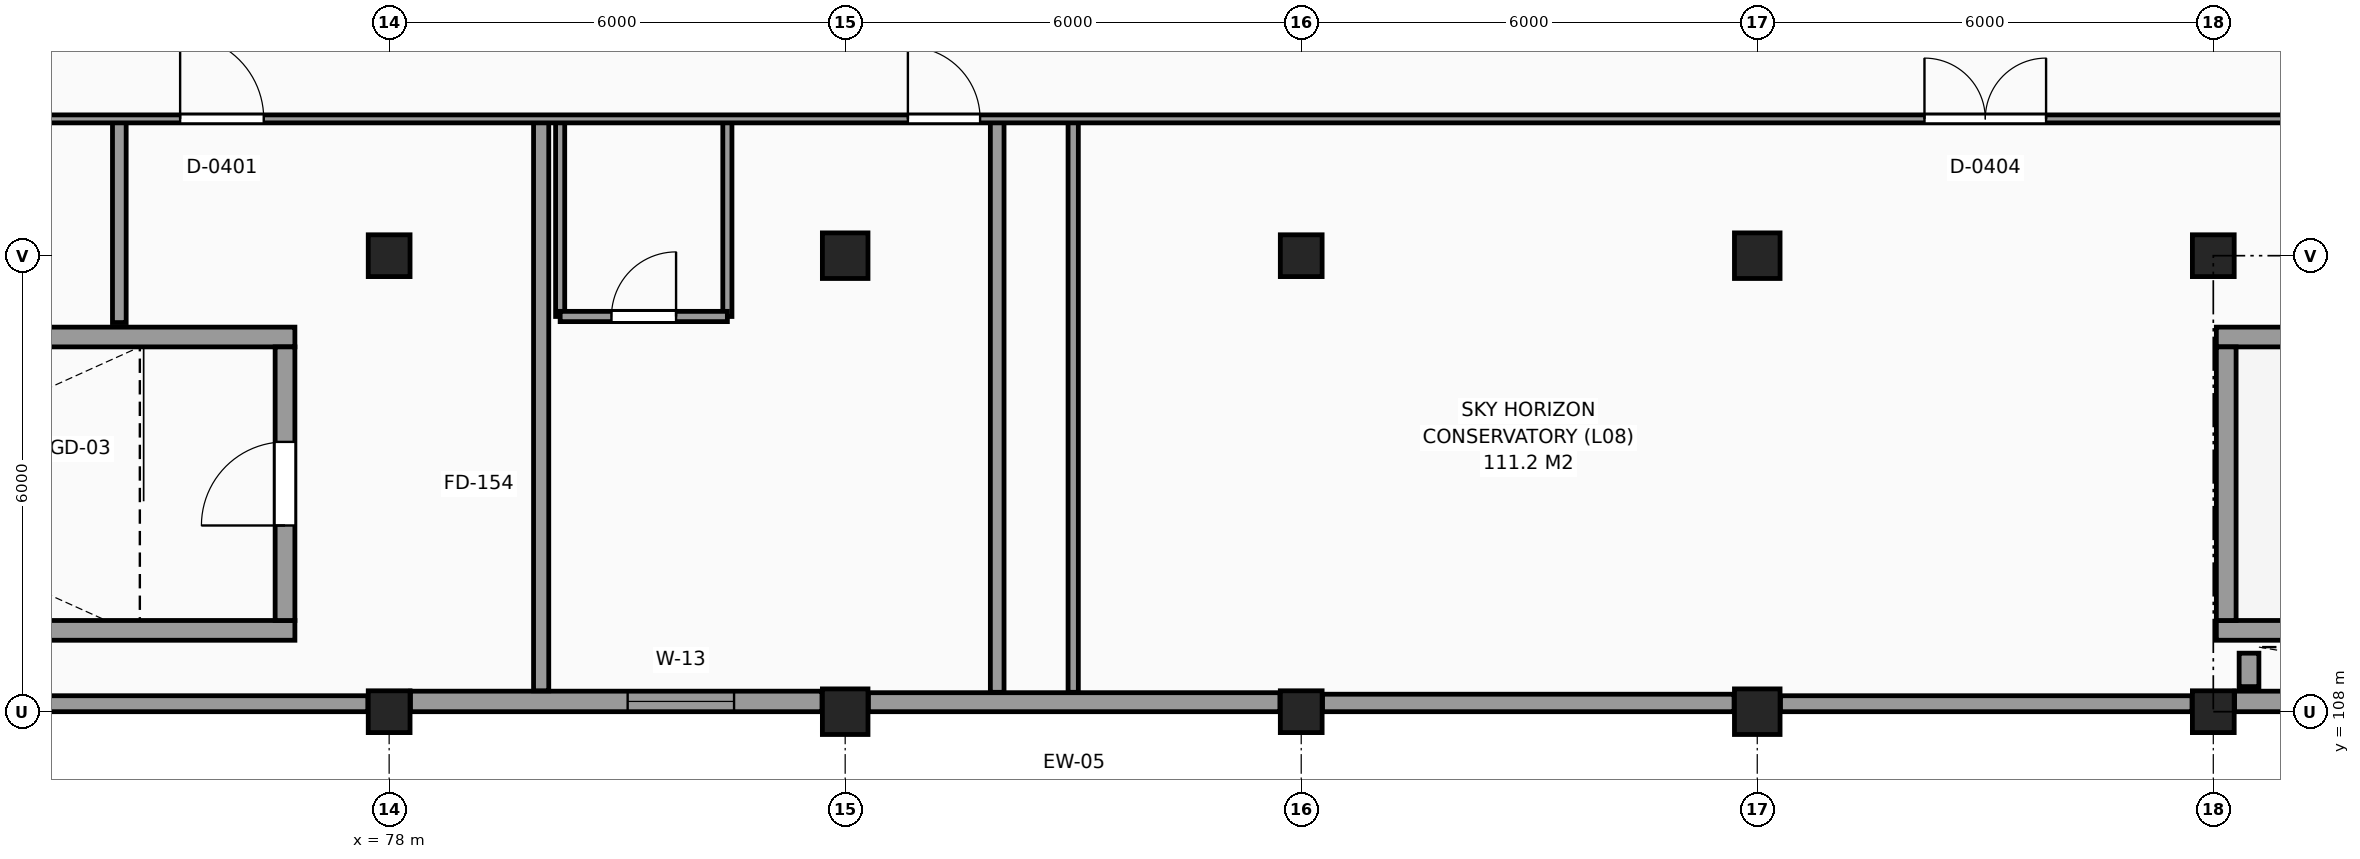
"""IFC4 building model, lengths in metres.
Left out: names, types, materials, properties, quantities, classifications, styles, units other than length and angle.
Written with IfcOpenShell. Run it as: python <this file> out.ifc"""

import sys

from ifc_helpers import new_model, si_unit, direction, frame, frame_2d, origin, origin_2d, place, context, subcontext, project, spatial, rectangle, extrude, element, fill, save


model = new_model("IFC4")
c1 = context("Model", 3, precision=1e-05, world=origin(), true_north=direction((0.0, 1.0)))
c2 = subcontext(c1, "Body", "Model", "MODEL_VIEW")
j1 = project(units=[si_unit("LENGTHUNIT", "METRE"), si_unit("PLANEANGLEUNIT", "RADIAN")], contexts=[c1])
p1 = place(None, origin())
s1 = spatial("IfcSite", under=j1, at=p1, CompositionType="ELEMENT")
p2 = place(p1, origin())
s2 = spatial("IfcBuilding", under=s1, at=p2, CompositionType="ELEMENT")
p3 = place(p2, frame((0.0, 0.0, 34.8)))
s3 = spatial("IfcBuildingStorey", under=s2, at=p3, CompositionType="ELEMENT", Elevation=34.8)
for number, where, z_axis, x_axis in (
    (1, (78.0, 108.0, 0.0), (0.0, 0.0, 1.0), (1.0, 0.0, 0.0)),
    (2, (78.0, 114.0, 0.0), (0.0, 0.0, 1.0), (1.0, 0.0, 0.0)),
):
    element("IfcColumn", number, at=place(p3, frame(where, z_axis=z_axis, x_axis=x_axis)), inside=s3, PredefinedType="COLUMN", context=c2, shape_type="SweptSolid", body=[
        extrude(rectangle(XDim=0.55, YDim=0.55, at=origin_2d()), origin(), (0.0, 0.0, 1.0), 3.3),
    ])
for number, where, z_axis, x_axis in (
    (3, (84.0, 108.0, 0.0), (0.0, 0.0, 1.0), (1.0, 0.0, 0.0)),
    (4, (84.0, 114.0, 0.0), (0.0, 0.0, 1.0), (1.0, 0.0, 0.0)),
):
    element("IfcColumn", number, at=place(p3, frame(where, z_axis=z_axis, x_axis=x_axis)), inside=s3, PredefinedType="COLUMN", context=c2, shape_type="SweptSolid", body=[
        extrude(rectangle(XDim=0.6, YDim=0.6, at=origin_2d()), origin(), (0.0, 0.0, 1.0), 3.3),
    ])
for number, where, z_axis, x_axis in (
    (5, (90.0, 108.0, 0.0), (0.0, 0.0, 1.0), (1.0, 0.0, 0.0)),
    (6, (90.0, 114.0, 0.0), (0.0, 0.0, 1.0), (1.0, 0.0, 0.0)),
):
    element("IfcColumn", number, at=place(p3, frame(where, z_axis=z_axis, x_axis=x_axis)), inside=s3, PredefinedType="COLUMN", context=c2, shape_type="SweptSolid", body=[
        extrude(rectangle(XDim=0.55, YDim=0.55, at=origin_2d()), origin(), (0.0, 0.0, 1.0), 3.3),
    ])
for number, where, z_axis, x_axis in (
    (7, (96.0, 108.0, 0.0), (0.0, 0.0, 1.0), (1.0, 0.0, 0.0)),
    (8, (96.0, 114.0, 0.0), (0.0, 0.0, 1.0), (1.0, 0.0, 0.0)),
):
    element("IfcColumn", number, at=place(p3, frame(where, z_axis=z_axis, x_axis=x_axis)), inside=s3, PredefinedType="COLUMN", context=c2, shape_type="SweptSolid", body=[
        extrude(rectangle(XDim=0.6, YDim=0.6, at=origin_2d()), origin(), (0.0, 0.0, 1.0), 3.3),
    ])
for number, where, z_axis, x_axis in (
    (9, (102.0, 108.0, 0.0), (0.0, 0.0, 1.0), (1.0, 0.0, 0.0)),
    (10, (102.0, 114.0, 0.0), (0.0, 0.0, 1.0), (1.0, 0.0, 0.0)),
):
    element("IfcColumn", number, at=place(p3, frame(where, z_axis=z_axis, x_axis=x_axis)), inside=s3, PredefinedType="COLUMN", context=c2, shape_type="SweptSolid", body=[
        extrude(rectangle(XDim=0.55, YDim=0.55, at=origin_2d()), origin(), (0.0, 0.0, 1.0), 3.3),
    ])
p4 = place(p3, frame((72.305, 108.105, 0.0), z_axis=(0.0, 0.0, 1.0), x_axis=(1.0, 0.0, 0.0)))
e11 = element("IfcWall", 11, at=p4, inside=s3, PredefinedType="SOLIDWALL", context=c2, shape_type="SweptSolid", body=[
    extrude(rectangle(XDim=5.415, YDim=0.21, at=frame_2d((2.708, 0.0))), origin(), (0.0, 0.0, 1.0), 2.445),
])
p5 = place(p3, frame((78.28, 108.135, 0.0), z_axis=(0.0, 0.0, 1.0), x_axis=(1.0, 0.0, 0.0)))
e12 = element("IfcWall", 12, at=p5, inside=s3, PredefinedType="SOLIDWALL", context=c2, shape_type="SweptSolid", body=[
    extrude(rectangle(XDim=5.415, YDim=0.27, at=frame_2d((2.708, 0.0))), origin(), (0.0, 0.0, 1.0), 2.445),
])
p6 = place(p5, frame((2.858, 0.0, 0.8)))
e13 = element("IfcOpeningElement", 13, at=p6, cuts=e12, PredefinedType="OPENING", context=c2, shape_type="SweptSolid", body=[
    extrude(rectangle(XDim=1.4, YDim=1.4, at=frame_2d((0.7, 0.7))), frame((0.0, 0.145, 0.0), z_axis=(0.0, -1.0, 0.0), x_axis=(1.0, 0.0, 0.0)), (0.0, 0.0, 1.0), 0.29),
])
p7 = place(p3, frame((84.305, 108.125, 0.0), z_axis=(0.0, 0.0, 1.0), x_axis=(1.0, 0.0, 0.0)))
e14 = element("IfcWall", 14, at=p7, inside=s3, PredefinedType="SOLIDWALL", context=c2, shape_type="SweptSolid", body=[
    extrude(rectangle(XDim=5.415, YDim=0.25, at=frame_2d((2.708, 0.0))), origin(), (0.0, 0.0, 1.0), 2.445),
])
p8 = place(p3, frame((90.28, 108.115, 0.0), z_axis=(0.0, 0.0, 1.0), x_axis=(1.0, 0.0, 0.0)))
e15 = element("IfcWall", 15, at=p8, inside=s3, PredefinedType="SOLIDWALL", context=c2, shape_type="SweptSolid", body=[
    extrude(rectangle(XDim=5.415, YDim=0.23, at=frame_2d((2.708, 0.0))), origin(), (0.0, 0.0, 1.0), 2.445),
])
p9 = place(p3, frame((96.305, 108.105, 0.0), z_axis=(0.0, 0.0, 1.0), x_axis=(1.0, 0.0, 0.0)))
e16 = element("IfcWall", 16, at=p9, inside=s3, PredefinedType="SOLIDWALL", context=c2, shape_type="SweptSolid", body=[
    extrude(rectangle(XDim=5.415, YDim=0.21, at=frame_2d((2.708, 0.0))), origin(), (0.0, 0.0, 1.0), 2.445),
])
p10 = place(p3, frame((102.28, 108.135, 0.0), z_axis=(0.0, 0.0, 1.0), x_axis=(1.0, 0.0, 0.0)))
e17 = element("IfcWall", 17, at=p10, inside=s3, PredefinedType="SOLIDWALL", context=c2, shape_type="SweptSolid", body=[
    extrude(rectangle(XDim=5.415, YDim=0.27, at=frame_2d((2.708, 0.0))), origin(), (0.0, 0.0, 1.0), 3.07),
])
for number, where, z_axis, x_axis in (
    (18, (102.04, 109.07, 0.0), (0.0, 0.0, 1.0), (1.0, 0.0, 0.0)),
    (19, (102.04, 112.93, 0.0), (0.0, 0.0, 1.0), (1.0, 0.0, 0.0)),
):
    element("IfcWall", number, at=place(p3, frame(where, z_axis=z_axis, x_axis=x_axis)), inside=s3, PredefinedType="SHEAR", context=c2, shape_type="SweptSolid", body=[
        extrude(rectangle(XDim=10.72, YDim=0.26, at=frame_2d((5.36, 0.0))), origin(), (0.0, 0.0, 1.0), 3.3),
    ])
p11 = place(p3, frame((102.17, 109.2, 0.0), z_axis=(0.0, 0.0, 1.0), x_axis=(0.0, 1.0, 0.0)))
e20 = element("IfcWall", 20, at=p11, inside=s3, PredefinedType="SHEAR", context=c2, shape_type="SweptSolid", body=[
    extrude(rectangle(XDim=3.6, YDim=0.26, at=frame_2d((1.8, 0.0))), origin(), (0.0, 0.0, 1.0), 3.3),
])
p12 = place(p3, frame((102.47, 108.33, 0.0), z_axis=(0.0, 0.0, 1.0), x_axis=(0.0, 1.0, 0.0)))
e21 = element("IfcWall", 21, at=p12, inside=s3, PredefinedType="SHEAR", context=c2, shape_type="SweptSolid", body=[
    extrude(rectangle(XDim=0.44, YDim=0.26, at=frame_2d((0.22, 0.0))), origin(), (0.0, 0.0, 1.0), 3.3),
])
for number, where, z_axis, x_axis in (
    (22, (66.04, 109.07, 0.0), (0.0, 0.0, 1.0), (1.0, 0.0, 0.0)),
    (23, (66.04, 112.93, 0.0), (0.0, 0.0, 1.0), (1.0, 0.0, 0.0)),
):
    element("IfcWall", number, at=place(p3, frame(where, z_axis=z_axis, x_axis=x_axis)), inside=s3, PredefinedType="SHEAR", context=c2, shape_type="SweptSolid", body=[
        extrude(rectangle(XDim=10.72, YDim=0.26, at=frame_2d((5.36, 0.0))), origin(), (0.0, 0.0, 1.0), 3.3),
    ])
p13 = place(p3, frame((76.63, 109.2, 0.0), z_axis=(0.0, 0.0, 1.0), x_axis=(0.0, 1.0, 0.0)))
e24 = element("IfcWall", 24, at=p13, inside=s3, PredefinedType="SHEAR", context=c2, shape_type="SweptSolid", body=[
    extrude(rectangle(XDim=3.6, YDim=0.26, at=frame_2d((1.8, 0.0))), origin(), (0.0, 0.0, 1.0), 3.3),
])
p14 = place(p13, frame((1.25, 0.0, 0.0)))
e25 = element("IfcOpeningElement", 25, at=p14, cuts=e24, PredefinedType="OPENING", context=c2, shape_type="SweptSolid", body=[
    extrude(rectangle(XDim=1.1, YDim=2.15, at=frame_2d((0.55, 1.075))), frame((0.0, 0.14, 0.0), z_axis=(0.0, -1.0, 0.0), x_axis=(1.0, 0.0, 0.0)), (0.0, 0.0, 1.0), 0.28),
])
p15 = place(p3, frame((74.45, 113.12, 0.0), z_axis=(0.0, 0.0, 1.0), x_axis=(0.0, 1.0, 0.0)))
e26 = element("IfcWall", 26, at=p15, inside=s3, PredefinedType="PARTITIONING", context=c2, shape_type="SweptSolid", body=[
    extrude(rectangle(XDim=2.68, YDim=0.18, at=frame_2d((1.34, 0.0))), origin(), (0.0, 0.0, 1.0), 3.07),
])
p16 = place(p3, frame((80.0, 108.275, 0.0), z_axis=(0.0, 0.0, 1.0), x_axis=(0.0, 1.0, 0.0)))
e27 = element("IfcWall", 27, at=p16, inside=s3, PredefinedType="PARTITIONING", context=c2, shape_type="SweptSolid", body=[
    extrude(rectangle(XDim=7.525, YDim=0.2, at=frame_2d((3.763, 0.0))), origin(), (0.0, 0.0, 1.0), 3.07),
])
for number, where, z_axis, x_axis in (
    (28, (80.25, 113.2, 0.0), (0.0, 0.0, 1.0), (0.0, 1.0, 0.0)),
    (29, (82.45, 113.2, 0.0), (0.0, 0.0, 1.0), (0.0, 1.0, 0.0)),
):
    element("IfcWall", number, at=place(p3, frame(where, z_axis=z_axis, x_axis=x_axis)), inside=s3, PredefinedType="PARTITIONING", context=c2, shape_type="SweptSolid", body=[
        extrude(rectangle(XDim=2.6, YDim=0.12, at=frame_2d((1.3, 0.0))), origin(), (0.0, 0.0, 1.0), 3.07),
    ])
p17 = place(p3, frame((86.0, 108.255, 0.0), z_axis=(0.0, 0.0, 1.0), x_axis=(0.0, 1.0, 0.0)))
e30 = element("IfcWall", 30, at=p17, inside=s3, PredefinedType="PARTITIONING", context=c2, shape_type="SweptSolid", body=[
    extrude(rectangle(XDim=7.545, YDim=0.18, at=frame_2d((3.772, 0.0))), origin(), (0.0, 0.0, 1.0), 3.07),
])
p18 = place(p3, frame((87.0, 108.255, 0.0), z_axis=(0.0, 0.0, 1.0), x_axis=(0.0, 1.0, 0.0)))
e31 = element("IfcWall", 31, at=p18, inside=s3, PredefinedType="PARTITIONING", context=c2, shape_type="SweptSolid", body=[
    extrude(rectangle(XDim=7.545, YDim=0.135, at=frame_2d((3.772, 0.0))), origin(), (0.0, 0.0, 1.0), 3.07),
])
p19 = place(p3, frame((80.25, 113.2, 0.0), z_axis=(0.0, 0.0, 1.0), x_axis=(1.0, 0.0, 0.0)))
e32 = element("IfcWall", 32, at=p19, inside=s3, PredefinedType="PARTITIONING", context=c2, shape_type="SweptSolid", body=[
    extrude(rectangle(XDim=2.2, YDim=0.135, at=frame_2d((1.1, 0.0))), origin(), (0.0, 0.0, 1.0), 3.07),
])
p20 = place(p19, frame((0.675, 0.0, 0.0)))
e33 = element("IfcOpeningElement", 33, at=p20, cuts=e32, PredefinedType="OPENING", context=c2, shape_type="SweptSolid", body=[
    extrude(rectangle(XDim=0.85, YDim=2.1, at=frame_2d((0.425, 1.05))), frame((0.0, 0.078, 0.0), z_axis=(0.0, -1.0, 0.0), x_axis=(1.0, 0.0, 0.0)), (0.0, 0.0, 1.0), 0.155),
])
p21 = place(p3, frame((66.275, 115.8, 0.0), z_axis=(0.0, 0.0, 1.0), x_axis=(1.0, 0.0, 0.0)))
e34 = element("IfcWall", 34, at=p21, inside=s3, PredefinedType="PARTITIONING", context=c2, shape_type="SweptSolid", body=[
    extrude(rectangle(XDim=103.525, YDim=0.105, at=frame_2d((51.763, 0.0))), origin(), (0.0, 0.0, 1.0), 3.07),
])
p22 = place(p21, frame((80.125, 0.0, 0.0)))
e35 = element("IfcOpeningElement", 35, at=p22, cuts=e34, PredefinedType="OPENING", context=c2, shape_type="SweptSolid", body=[
    extrude(rectangle(XDim=1.2, YDim=2.2, at=frame_2d((0.6, 1.1))), frame((0.0, 0.062, 0.0), z_axis=(0.0, -1.0, 0.0), x_axis=(1.0, 0.0, 0.0)), (0.0, 0.0, 1.0), 0.125),
])
p23 = place(p21, frame((50.125, 0.0, 0.0)))
e36 = element("IfcOpeningElement", 36, at=p23, cuts=e34, PredefinedType="OPENING", context=c2, shape_type="SweptSolid", body=[
    extrude(rectangle(XDim=1.2, YDim=2.2, at=frame_2d((0.6, 1.1))), frame((0.0, 0.062, 0.0), z_axis=(0.0, -1.0, 0.0), x_axis=(1.0, 0.0, 0.0)), (0.0, 0.0, 1.0), 0.125),
])
p24 = place(p21, frame((8.975, 0.0, 0.0)))
e37 = element("IfcOpeningElement", 37, at=p24, cuts=e34, PredefinedType="OPENING", context=c2, shape_type="SweptSolid", body=[
    extrude(rectangle(XDim=1.1, YDim=2.15, at=frame_2d((0.55, 1.075))), frame((0.0, 0.062, 0.0), z_axis=(0.0, -1.0, 0.0), x_axis=(1.0, 0.0, 0.0)), (0.0, 0.0, 1.0), 0.125),
])
p25 = place(p21, frame((55.275, 0.0, 0.0)))
e38 = element("IfcOpeningElement", 38, at=p25, cuts=e34, PredefinedType="OPENING", context=c2, shape_type="SweptSolid", body=[
    extrude(rectangle(XDim=1.0, YDim=2.15, at=frame_2d((0.5, 1.075))), frame((0.0, 0.062, 0.0), z_axis=(0.0, -1.0, 0.0), x_axis=(1.0, 0.0, 0.0)), (0.0, 0.0, 1.0), 0.125),
])
p26 = place(p21, frame((62.245, 0.0, 0.0)))
e39 = element("IfcOpeningElement", 39, at=p26, cuts=e34, PredefinedType="OPENING", context=c2, shape_type="SweptSolid", body=[
    extrude(rectangle(XDim=0.96, YDim=2.15, at=frame_2d((0.48, 1.075))), frame((0.0, 0.062, 0.0), z_axis=(0.0, -1.0, 0.0), x_axis=(1.0, 0.0, 0.0)), (0.0, 0.0, 1.0), 0.125),
])
p27 = place(p21, frame((31.925, 0.0, 0.0)))
e40 = element("IfcOpeningElement", 40, at=p27, cuts=e34, PredefinedType="OPENING", context=c2, shape_type="SweptSolid", body=[
    extrude(rectangle(XDim=1.6, YDim=2.25, at=frame_2d((0.8, 1.125))), frame((0.0, 0.062, 0.0), z_axis=(0.0, -1.0, 0.0), x_axis=(1.0, 0.0, 0.0)), (0.0, 0.0, 1.0), 0.125),
])
p28 = place(p21, frame((18.55, 0.0, 0.0)))
e41 = element("IfcOpeningElement", 41, at=p28, cuts=e34, PredefinedType="OPENING", context=c2, shape_type="SweptSolid", body=[
    extrude(rectangle(XDim=0.95, YDim=2.1, at=frame_2d((0.475, 1.05))), frame((0.0, 0.062, 0.0), z_axis=(0.0, -1.0, 0.0), x_axis=(1.0, 0.0, 0.0)), (0.0, 0.0, 1.0), 0.125),
])
p29 = place(p21, frame((84.45, 0.0, 0.0)))
e42 = element("IfcOpeningElement", 42, at=p29, cuts=e34, PredefinedType="OPENING", context=c2, shape_type="SweptSolid", body=[
    extrude(rectangle(XDim=0.95, YDim=2.1, at=frame_2d((0.475, 1.05))), frame((0.0, 0.062, 0.0), z_axis=(0.0, -1.0, 0.0), x_axis=(1.0, 0.0, 0.0)), (0.0, 0.0, 1.0), 0.125),
])
p30 = place(p6, origin())
e43 = element("IfcWindow", 43, at=p30, inside=s3, PartitioningType="SINGLE_PANEL", PredefinedType="WINDOW", context=c2, shape_type="SweptSolid", body=[
    extrude(rectangle(XDim=1.4, YDim=1.4, at=frame_2d((0.7, 0.7))), frame((0.0, 0.03, 0.0), z_axis=(0.0, -1.0, 0.0), x_axis=(1.0, 0.0, 0.0)), (0.0, 0.0, 1.0), 0.06),
])
fill(e13, e43)
p31 = place(p14, origin())
e44 = element("IfcDoor", 44, at=p31, inside=s3, OperationType="SINGLE_SWING_LEFT", PredefinedType="DOOR", context=c2, shape_type="SweptSolid", body=[
    extrude(rectangle(XDim=1.1, YDim=2.15, at=frame_2d((0.55, 1.075))), frame((0.0, 0.025, 0.0), z_axis=(0.0, -1.0, 0.0), x_axis=(1.0, 0.0, 0.0)), (0.0, 0.0, 1.0), 0.05),
])
fill(e25, e44)
p32 = place(p24, origin())
e45 = element("IfcDoor", 45, at=p32, inside=s3, OperationType="SINGLE_SWING_LEFT", PredefinedType="DOOR", context=c2, shape_type="SweptSolid", body=[
    extrude(rectangle(XDim=1.1, YDim=2.15, at=frame_2d((0.55, 1.075))), frame((0.0, 0.025, 0.0), z_axis=(0.0, -1.0, 0.0), x_axis=(1.0, 0.0, 0.0)), (0.0, 0.0, 1.0), 0.05),
])
fill(e37, e45)
p33 = place(p27, origin())
e46 = element("IfcDoor", 46, at=p33, inside=s3, OperationType="DOUBLE_DOOR_SINGLE_SWING", PredefinedType="DOOR", context=c2, shape_type="SweptSolid", body=[
    extrude(rectangle(XDim=1.6, YDim=2.25, at=frame_2d((0.8, 1.125))), frame((0.0, 0.025, 0.0), z_axis=(0.0, -1.0, 0.0), x_axis=(1.0, 0.0, 0.0)), (0.0, 0.0, 1.0), 0.05),
])
fill(e40, e46)
p34 = place(p20, origin())
e47 = element("IfcDoor", 47, at=p34, inside=s3, OperationType="SINGLE_SWING_RIGHT", PredefinedType="DOOR", context=c2, shape_type="SweptSolid", body=[
    extrude(rectangle(XDim=0.85, YDim=2.1, at=frame_2d((0.425, 1.05))), frame((0.0, 0.025, 0.0), z_axis=(0.0, -1.0, 0.0), x_axis=(1.0, 0.0, 0.0)), (0.0, 0.0, 1.0), 0.05),
])
fill(e33, e47)
p35 = place(p28, origin())
e48 = element("IfcDoor", 48, at=p35, inside=s3, OperationType="SINGLE_SWING_LEFT", PredefinedType="DOOR", context=c2, shape_type="SweptSolid", body=[
    extrude(rectangle(XDim=0.95, YDim=2.1, at=frame_2d((0.475, 1.05))), frame((0.0, 0.025, 0.0), z_axis=(0.0, -1.0, 0.0), x_axis=(1.0, 0.0, 0.0)), (0.0, 0.0, 1.0), 0.05),
])
fill(e41, e48)
save(model, sys.argv[1])
